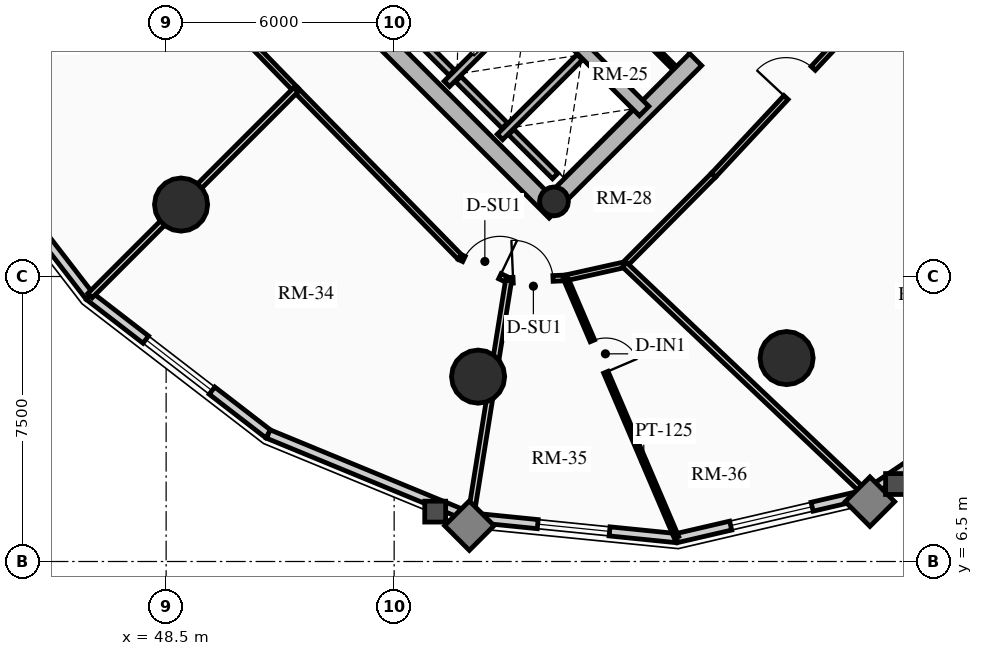
"""IFC4 building model, lengths in metres.
Left out: names, types, materials, properties, quantities, classifications, styles, units other than length and angle.
Written with IfcOpenShell. Run it as: python <this file> out.ifc"""

import sys

from ifc_helpers import new_model, si_unit, direction, frame, frame_2d, origin, origin_2d, place, context, subcontext, project, spatial, rectangle, circle, hollow_circle, extrude, source, transform, mapped, element, fill, save


model = new_model("IFC4")
c1 = context("Model", 3, precision=1e-05, world=origin(), true_north=direction((0.0, 1.0)))
c2 = subcontext(c1, "Body", "Model", "MODEL_VIEW")
j1 = project(units=[si_unit("LENGTHUNIT", "METRE"), si_unit("PLANEANGLEUNIT", "RADIAN")], contexts=[c1])
p1 = place(None, origin())
s1 = spatial("IfcSite", under=j1, at=p1, CompositionType="ELEMENT")
p2 = place(p1, origin())
s2 = spatial("IfcBuilding", under=s1, at=p2, CompositionType="ELEMENT")
p3 = place(p2, frame((0.0, 0.0, 84.7)))
s3 = spatial("IfcBuildingStorey", under=s2, at=p3, CompositionType="ELEMENT", Elevation=84.7)
p4 = place(p3, frame((58.737, 15.697, 0.0), z_axis=(0.0, 0.0, 1.0), x_axis=(-0.707106781187, 0.707106781187, 0.0)))
e1 = element("IfcWall", 1, at=p4, inside=s3, PredefinedType="SHEAR", context=c2, shape_type="SweptSolid", body=[
    extrude(rectangle(XDim=14.2, YDim=0.45, at=frame_2d((7.1, 0.0))), origin(), (0.0, 0.0, 1.0), 2.91),
])
p5 = place(p3, frame((58.578, 15.856, 0.0), z_axis=(0.0, 0.0, 1.0), x_axis=(0.707106781187, 0.707106781187, 0.0)))
e2 = element("IfcWall", 2, at=p5, inside=s3, PredefinedType="SHEAR", context=c2, shape_type="SweptSolid", body=[
    extrude(rectangle(XDim=10.7, YDim=0.45, at=frame_2d((5.35, 0.0))), origin(), (0.0, 0.0, 1.0), 2.91),
])
m1 = source(origin(), c2, "Body", "SweptSolid", [
    extrude(rectangle(XDim=1.5, YDim=2.02, at=frame_2d((0.75, 1.01))), frame((0.0, 0.235, 0.0), z_axis=(0.0, -1.0, 0.0), x_axis=(1.0, 0.0, 0.0)), (0.0, 0.0, 1.0), 0.47),
])
p6 = place(p5, frame((5.45, 0.0, 0.0)))
e3 = element("IfcOpeningElement", 3, at=p6, cuts=e2, PredefinedType="OPENING", context=c2, shape_type="MappedRepresentation", body=[
    mapped(m1, transform((0.0, 0.0, 0.0), x_axis=(1.0, 0.0, 0.0), y_axis=(0.0, 1.0, 0.0), z_axis=(0.0, 0.0, 1.0), scale=1.0)),
])
p7 = place(p3, frame((61.078, 18.355, 0.0), z_axis=(0.0, 0.0, 1.0), x_axis=(-0.707106781187, 0.707106781187, 0.0)))
e4 = element("IfcWall", 4, at=p7, inside=s3, PredefinedType="SHEAR", context=c2, shape_type="SweptSolid", body=[
    extrude(rectangle(XDim=13.75, YDim=0.35, at=frame_2d((6.875, 0.0))), origin(), (0.0, 0.0, 1.0), 2.91),
])
m2 = source(origin(), c2, "Body", "SweptSolid", [
    extrude(rectangle(XDim=1.1, YDim=2.015, at=frame_2d((0.55, 1.007))), frame((0.0, 0.185, 0.0), z_axis=(0.0, -1.0, 0.0), x_axis=(1.0, 0.0, 0.0)), (0.0, 0.0, 1.0), 0.37),
])
p8 = place(p7, frame((4.875, 0.0, 0.0)))
e5 = element("IfcOpeningElement", 5, at=p8, cuts=e4, PredefinedType="OPENING", context=c2, shape_type="MappedRepresentation", body=[
    mapped(m2, transform((0.0, 0.0, 0.0), x_axis=(1.0, 0.0, 0.0), y_axis=(0.0, 1.0, 0.0), z_axis=(0.0, 0.0, 1.0), scale=1.0)),
])
m3 = source(origin(), c2, "Body", "SweptSolid", [
    extrude(rectangle(XDim=1.15, YDim=2.02, at=frame_2d((0.575, 1.01))), frame((0.0, 0.185, 0.0), z_axis=(0.0, -1.0, 0.0), x_axis=(1.0, 0.0, 0.0)), (0.0, 0.0, 1.0), 0.37),
])
p9 = place(p7, frame((7.295, 0.0, 0.0)))
e6 = element("IfcOpeningElement", 6, at=p9, cuts=e4, PredefinedType="OPENING", context=c2, shape_type="MappedRepresentation", body=[
    mapped(m3, transform((0.0, 0.0, 0.0), x_axis=(1.0, 0.0, 0.0), y_axis=(0.0, 1.0, 0.0), z_axis=(0.0, 0.0, 1.0), scale=1.0)),
])
p10 = place(p3, frame((58.706, 15.976, 0.0), z_axis=(0.0, 0.0, 1.0), x_axis=(0.707106781187, 0.707106781187, 0.0)))
e7 = element("IfcColumn", 7, at=p10, inside=s3, PredefinedType="COLUMN", context=c2, shape_type="SweptSolid", body=[
    extrude(hollow_circle(Radius=0.38, WallThickness=0.032, at=origin_2d()), origin(), (0.0, 0.0, 1.0), 2.91),
])
for number, where, z_axis, x_axis in (
    (8, (48.893, 15.893, 0.0), (0.0, 0.0, 1.0), (1.0, 0.0, 0.0)),
    (9, (56.709, 11.365, 0.0), (0.0, 0.0, 1.0), (1.0, 0.0, 0.0)),
    (10, (64.827, 11.854, 0.0), (0.0, 0.0, 1.0), (1.0, 0.0, 0.0)),
):
    element("IfcColumn", number, at=place(p3, frame(where, z_axis=z_axis, x_axis=x_axis)), inside=s3, PredefinedType="USERDEFINED", context=c2, shape_type="SweptSolid", body=[
        extrude(circle(Radius=0.7, at=origin_2d()), origin(), (0.0, 0.0, 1.0), 2.91),
    ])
p11 = place(p3, frame((46.483, 13.483, 0.0), z_axis=(0.0, 0.0, 1.0), x_axis=(-0.61054437102, 0.791982052206, 0.0)))
e11 = element("IfcWall", 11, at=p11, inside=s3, PredefinedType="SOLIDWALL", context=c2, shape_type="SweptSolid", body=[
    extrude(rectangle(XDim=5.942, YDim=0.24, at=frame_2d((2.971, 0.0))), origin(), (0.0, 0.0, 1.0), 2.179),
])
p12 = place(p3, frame((51.189, 9.855, 0.0), z_axis=(0.0, 0.0, 1.0), x_axis=(-0.791982052206, 0.61054437102, 0.0)))
e12 = element("IfcWall", 12, at=p12, inside=s3, PredefinedType="SOLIDWALL", context=c2, shape_type="SweptSolid", body=[
    extrude(rectangle(XDim=5.942, YDim=0.24, at=frame_2d((2.971, 0.0))), origin(), (0.0, 0.0, 1.0), 2.179),
])
m4 = source(origin(), c2, "Body", "SweptSolid", [
    extrude(rectangle(XDim=2.2, YDim=1.35, at=frame_2d((1.1, 0.675))), frame((0.0, 0.13, 0.0), z_axis=(0.0, -1.0, 0.0), x_axis=(1.0, 0.0, 0.0)), (0.0, 0.0, 1.0), 0.26),
])
p13 = place(p12, frame((1.871, 0.0, 0.65)))
e13 = element("IfcOpeningElement", 13, at=p13, cuts=e12, PredefinedType="OPENING", context=c2, shape_type="MappedRepresentation", body=[
    mapped(m4, transform((0.0, 0.0, 0.0), x_axis=(1.0, 0.0, 0.0), y_axis=(0.0, 1.0, 0.0), z_axis=(0.0, 0.0, 1.0), scale=1.0)),
])
p14 = place(p3, frame((56.513, 7.661, 0.0), z_axis=(0.0, 0.0, 1.0), x_axis=(-0.924563909604, 0.381027003055, 0.0)))
e14 = element("IfcWall", 14, at=p14, inside=s3, PredefinedType="SOLIDWALL", context=c2, shape_type="SweptSolid", body=[
    extrude(rectangle(XDim=5.758, YDim=0.24, at=frame_2d((2.879, 0.0))), origin(), (0.0, 0.0, 1.0), 2.179),
])
p15 = place(p3, frame((61.933, 7.115, 0.0), z_axis=(0.0, 0.0, 1.0), x_axis=(-0.994971754311, 0.10015591906, 0.0)))
e15 = element("IfcWall", 15, at=p15, inside=s3, PredefinedType="SOLIDWALL", context=c2, shape_type="SweptSolid", body=[
    extrude(rectangle(XDim=5.448, YDim=0.24, at=frame_2d((2.724, 0.0))), origin(), (0.0, 0.0, 1.0), 2.179),
])
m5 = source(origin(), c2, "Body", "SweptSolid", [
    extrude(rectangle(XDim=1.9, YDim=1.35, at=frame_2d((0.95, 0.675))), frame((0.0, 0.13, 0.0), z_axis=(0.0, -1.0, 0.0), x_axis=(1.0, 0.0, 0.0)), (0.0, 0.0, 1.0), 0.26),
])
p16 = place(p15, frame((1.774, 0.0, 0.65)))
e16 = element("IfcOpeningElement", 16, at=p16, cuts=e15, PredefinedType="OPENING", context=c2, shape_type="MappedRepresentation", body=[
    mapped(m5, transform((0.0, 0.0, 0.0), x_axis=(1.0, 0.0, 0.0), y_axis=(0.0, 1.0, 0.0), z_axis=(0.0, 0.0, 1.0), scale=1.0)),
])
p17 = place(p3, frame((66.92, 8.271, 0.0), z_axis=(0.0, 0.0, 1.0), x_axis=(-0.974165631126, -0.225834725257, 0.0)))
e17 = element("IfcWall", 17, at=p17, inside=s3, PredefinedType="SOLIDWALL", context=c2, shape_type="SweptSolid", body=[
    extrude(rectangle(XDim=5.119, YDim=0.24, at=frame_2d((2.56, 0.0))), origin(), (0.0, 0.0, 1.0), 2.179),
])
p18 = place(p17, frame((1.459, 0.0, 0.65)))
e18 = element("IfcOpeningElement", 18, at=p18, cuts=e17, PredefinedType="OPENING", context=c2, shape_type="MappedRepresentation", body=[
    mapped(m4, transform((0.0, 0.0, 0.0), x_axis=(1.0, 0.0, 0.0), y_axis=(0.0, 1.0, 0.0), z_axis=(0.0, 0.0, 1.0), scale=1.0)),
])
p19 = place(p3, frame((70.985, 11.015, 0.0), z_axis=(0.0, 0.0, 1.0), x_axis=(-0.828781148131, -0.559572880421, 0.0)))
e19 = element("IfcWall", 19, at=p19, inside=s3, PredefinedType="SOLIDWALL", context=c2, shape_type="SweptSolid", body=[
    extrude(rectangle(XDim=4.905, YDim=0.24, at=frame_2d((2.452, 0.0))), origin(), (0.0, 0.0, 1.0), 2.179),
])
p20 = place(p3, frame((55.888, 19.069, 0.0), z_axis=(0.0, 0.0, 1.0), x_axis=(0.707106781187, 0.707106781187, 0.0)))
e20 = element("IfcWall", 20, at=p20, inside=s3, PredefinedType="SHEAR", context=c2, shape_type="SweptSolid", body=[
    extrude(rectangle(XDim=2.97, YDim=0.2, at=frame_2d((1.485, 0.0))), origin(), (0.0, 0.0, 1.0), 2.91),
])
p21 = place(p3, frame((56.015, 19.366, 0.0), z_axis=(0.0, 0.0, 1.0), x_axis=(-0.707106781187, 0.707106781187, 0.0)))
e21 = element("IfcWall", 21, at=p21, inside=s3, PredefinedType="SHEAR", context=c2, shape_type="SweptSolid", body=[
    extrude(rectangle(XDim=2.44, YDim=0.2, at=frame_2d((1.22, 0.0))), origin(), (0.0, 0.0, 1.0), 2.91),
])
p22 = place(p3, frame((57.284, 17.673, 0.0), z_axis=(0.0, 0.0, 1.0), x_axis=(0.707147878904, 0.70706568108, 0.0)))
e22 = element("IfcWall", 22, at=p22, inside=s3, PredefinedType="SHEAR", context=c2, shape_type="SweptSolid", body=[
    extrude(rectangle(XDim=2.97, YDim=0.2, at=frame_2d((1.485, 0.0))), origin(), (0.0, 0.0, 1.0), 2.91),
])
p23 = place(p3, frame((57.412, 17.97, 0.0), z_axis=(0.0, 0.0, 1.0), x_axis=(-0.707106781187, 0.707106781187, 0.0)))
e23 = element("IfcWall", 23, at=p23, inside=s3, PredefinedType="SHEAR", context=c2, shape_type="SweptSolid", body=[
    extrude(rectangle(XDim=1.735, YDim=0.2, at=frame_2d((0.867, 0.0))), origin(), (0.0, 0.0, 1.0), 2.91),
])
p24 = place(p3, frame((58.737, 16.644, 0.0), z_axis=(0.0, 0.0, 1.0), x_axis=(-0.707032117043, 0.707181437447, 0.0)))
e24 = element("IfcWall", 24, at=p24, inside=s3, PredefinedType="SHEAR", context=c2, shape_type="SweptSolid", body=[
    extrude(rectangle(XDim=1.635, YDim=0.2, at=frame_2d((0.817, 0.0))), origin(), (0.0, 0.0, 1.0), 2.91),
])
p25 = place(p3, frame((61.835, 19.529, 0.0), z_axis=(0.0, 0.0, 1.0), x_axis=(-0.707146413884, 0.707067146267, 0.0)))
e25 = element("IfcWall", 25, at=p25, inside=s3, PredefinedType="PARTITIONING", context=c2, shape_type="SweptSolid", body=[
    extrude(rectangle(XDim=3.08, YDim=0.125, at=frame_2d((1.54, 0.0))), origin(), (0.0, 0.0, 1.0), 2.655),
])
m6 = source(origin(), c2, "Body", "SweptSolid", [
    extrude(rectangle(XDim=0.9, YDim=2.005, at=frame_2d((0.45, 1.002))), frame((0.0, 0.073, 0.0), z_axis=(0.0, -1.0, 0.0), x_axis=(1.0, 0.0, 0.0)), (0.0, 0.0, 1.0), 0.145),
])
p26 = place(p25, frame((1.05, 0.0, 0.0)))
e26 = element("IfcOpeningElement", 26, at=p26, cuts=e25, PredefinedType="OPENING", context=c2, shape_type="MappedRepresentation", body=[
    mapped(m6, transform((0.0, 0.0, 0.0), x_axis=(1.0, 0.0, 0.0), y_axis=(0.0, 1.0, 0.0), z_axis=(0.0, 0.0, 1.0), scale=1.0)),
])
p27 = place(p3, frame((47.706, 23.253, 0.0), z_axis=(0.0, 0.0, 1.0), x_axis=(0.696179266346, -0.717867974707, 0.0)))
e27 = element("IfcWall", 27, at=p27, inside=s3, PredefinedType="PARTITIONING", context=c2, shape_type="SweptSolid", body=[
    extrude(rectangle(XDim=6.045, YDim=0.15, at=frame_2d((3.022, 0.0))), origin(), (0.0, 0.0, 1.0), 2.655),
])
m7 = source(origin(), c2, "Body", "SweptSolid", [
    extrude(rectangle(XDim=1.05, YDim=2.015, at=frame_2d((0.525, 1.007))), frame((0.0, 0.085, 0.0), z_axis=(0.0, -1.0, 0.0), x_axis=(1.0, 0.0, 0.0)), (0.0, 0.0, 1.0), 0.17),
])
p28 = place(p27, frame((2.497, 0.0, 0.0)))
e28 = element("IfcOpeningElement", 28, at=p28, cuts=e27, PredefinedType="OPENING", context=c2, shape_type="MappedRepresentation", body=[
    mapped(m7, transform((0.0, 0.0, 0.0), x_axis=(1.0, 0.0, 0.0), y_axis=(0.0, 1.0, 0.0), z_axis=(0.0, 0.0, 1.0), scale=1.0)),
])
p29 = place(p3, frame((51.914, 18.914, 0.0), z_axis=(0.0, 0.0, 1.0), x_axis=(0.699999313799, -0.714143515465, 0.0)))
e29 = element("IfcWall", 29, at=p29, inside=s3, PredefinedType="PARTITIONING", context=c2, shape_type="SweptSolid", body=[
    extrude(rectangle(XDim=6.162, YDim=0.15, at=frame_2d((3.081, 0.0))), origin(), (0.0, 0.0, 1.0), 2.225),
])
p30 = place(p3, frame((56.227, 14.513, 0.0), z_axis=(0.0, 0.0, 1.0), x_axis=(0.901477579283, -0.432825801044, 0.0)))
e30 = element("IfcWall", 30, at=p30, inside=s3, PredefinedType="PARTITIONING", context=c2, shape_type="SweptSolid", body=[
    extrude(rectangle(XDim=1.424, YDim=0.15, at=frame_2d((0.712, 0.0))), origin(), (0.0, 0.0, 1.0), 2.225),
])
p31 = place(p30, frame((0.12, 0.0, 0.0)))
e31 = element("IfcOpeningElement", 31, at=p31, cuts=e30, PredefinedType="OPENING", context=c2, shape_type="MappedRepresentation", body=[
    mapped(m7, transform((0.0, 0.0, 0.0), x_axis=(1.0, 0.0, 0.0), y_axis=(0.0, 1.0, 0.0), z_axis=(0.0, 0.0, 1.0), scale=1.0)),
])
p32 = place(p3, frame((57.511, 13.897, 0.0), z_axis=(0.0, 0.0, 1.0), x_axis=(0.999024538494, 0.044158481476, 0.0)))
e32 = element("IfcWall", 32, at=p32, inside=s3, PredefinedType="PARTITIONING", context=c2, shape_type="SweptSolid", body=[
    extrude(rectangle(XDim=1.498, YDim=0.15, at=frame_2d((0.749, 0.0))), origin(), (0.0, 0.0, 1.0), 2.225),
])
p33 = place(p32, frame((0.12, 0.0, 0.0)))
e33 = element("IfcOpeningElement", 33, at=p33, cuts=e32, PredefinedType="OPENING", context=c2, shape_type="MappedRepresentation", body=[
    mapped(m7, transform((0.0, 0.0, 0.0), x_axis=(1.0, 0.0, 0.0), y_axis=(0.0, 1.0, 0.0), z_axis=(0.0, 0.0, 1.0), scale=1.0)),
])
p34 = place(p3, frame((59.008, 13.963, 0.0), z_axis=(0.0, 0.0, 1.0), x_axis=(0.976020856791, 0.21767702476, 0.0)))
e34 = element("IfcWall", 34, at=p34, inside=s3, PredefinedType="PARTITIONING", context=c2, shape_type="SweptSolid", body=[
    extrude(rectangle(XDim=1.593, YDim=0.15, at=frame_2d((0.796, 0.0))), origin(), (0.0, 0.0, 1.0), 2.225),
])
p35 = place(p3, frame((60.562, 14.31, 0.0), z_axis=(0.0, 0.0, 1.0), x_axis=(0.704566236161, 0.709638230975, 0.0)))
e35 = element("IfcWall", 35, at=p35, inside=s3, PredefinedType="PARTITIONING", context=c2, shape_type="SweptSolid", body=[
    extrude(rectangle(XDim=3.321, YDim=0.15, at=frame_2d((1.661, 0.0))), origin(), (0.0, 0.0, 1.0), 2.225),
])
p36 = place(p3, frame((62.903, 16.667, 0.0), z_axis=(0.0, 0.0, 1.0), x_axis=(0.682371947497, 0.731005147225, 0.0)))
e36 = element("IfcWall", 36, at=p36, inside=s3, PredefinedType="PARTITIONING", context=c2, shape_type="SweptSolid", body=[
    extrude(rectangle(XDim=6.642, YDim=0.15, at=frame_2d((3.321, 0.0))), origin(), (0.0, 0.0, 1.0), 2.225),
])
p37 = place(p36, frame((2.796, 0.0, 0.0)))
e37 = element("IfcOpeningElement", 37, at=p37, cuts=e36, PredefinedType="OPENING", context=c2, shape_type="MappedRepresentation", body=[
    mapped(m7, transform((0.0, 0.0, 0.0), x_axis=(1.0, 0.0, 0.0), y_axis=(0.0, 1.0, 0.0), z_axis=(0.0, 0.0, 1.0), scale=1.0)),
])
p38 = place(p3, frame((51.914, 18.914, 0.0), z_axis=(0.0, 0.0, 1.0), x_axis=(-0.707106781187, -0.707106781187, 0.0)))
e38 = element("IfcWall", 38, at=p38, inside=s3, PredefinedType="PARTITIONING", context=c2, shape_type="SweptSolid", body=[
    extrude(rectangle(XDim=7.661, YDim=0.16, at=frame_2d((3.831, 0.0))), origin(), (0.0, 0.0, 1.0), 2.179),
])
p39 = place(p3, frame((57.511, 13.897, 0.0), z_axis=(0.0, 0.0, 1.0), x_axis=(-0.15810696167, -0.987421991183, 0.0)))
e39 = element("IfcWall", 39, at=p39, inside=s3, PredefinedType="PARTITIONING", context=c2, shape_type="SweptSolid", body=[
    extrude(rectangle(XDim=6.295, YDim=0.16, at=frame_2d((3.148, 0.0))), origin(), (0.0, 0.0, 1.0), 2.179),
])
p40 = place(p3, frame((60.562, 14.31, 0.0), z_axis=(0.0, 0.0, 1.0), x_axis=(0.725582293335, -0.688135404989, 0.0)))
e40 = element("IfcWall", 40, at=p40, inside=s3, PredefinedType="PARTITIONING", context=c2, shape_type="SweptSolid", body=[
    extrude(rectangle(XDim=8.749, YDim=0.16, at=frame_2d((4.375, 0.0))), origin(), (0.0, 0.0, 1.0), 2.179),
])
p41 = place(p3, frame((67.435, 21.521, 0.0), z_axis=(0.0, 0.0, 1.0), x_axis=(0.6983880073, -0.715719352302, 0.0)))
e41 = element("IfcWall", 41, at=p41, inside=s3, PredefinedType="PARTITIONING", context=c2, shape_type="SweptSolid", body=[
    extrude(rectangle(XDim=8.987, YDim=0.16, at=frame_2d((4.494, 0.0))), origin(), (0.0, 0.0, 1.0), 2.179),
])
p42 = place(p3, frame((59.008, 13.963, 0.0), z_axis=(0.0, 0.0, 1.0), x_axis=(0.393439207333, -0.919350635032, 0.0)))
e42 = element("IfcWall", 42, at=p42, inside=s3, PredefinedType="PARTITIONING", context=c2, shape_type="SweptSolid", body=[
    extrude(rectangle(XDim=7.427, YDim=0.125, at=frame_2d((3.713, 0.0))), origin(), (0.0, 0.0, 1.0), 2.179),
])
p43 = place(p42, frame((1.8, 0.0, 0.0)))
e43 = element("IfcOpeningElement", 43, at=p43, cuts=e42, PredefinedType="OPENING", context=c2, shape_type="MappedRepresentation", body=[
    mapped(m6, transform((0.0, 0.0, 0.0), x_axis=(1.0, 0.0, 0.0), y_axis=(0.0, 1.0, 0.0), z_axis=(0.0, 0.0, 1.0), scale=1.0)),
])
m8 = source(origin(), c2, "Body", "SweptSolid", [
    extrude(rectangle(XDim=2.2, YDim=1.35, at=frame_2d((1.1, 0.675))), frame((0.0, 0.03, 0.0), z_axis=(0.0, -1.0, 0.0), x_axis=(1.0, 0.0, 0.0)), (0.0, 0.0, 1.0), 0.06),
])
p44 = place(p13, origin())
e44 = element("IfcWindow", 44, at=p44, inside=s3, PartitioningType="DOUBLE_PANEL_VERTICAL", PredefinedType="WINDOW", context=c2, shape_type="MappedRepresentation", body=[
    mapped(m8, transform((0.0, 0.0, 0.0), x_axis=(1.0, 0.0, 0.0), y_axis=(0.0, 1.0, 0.0), z_axis=(0.0, 0.0, 1.0), scale=1.0)),
])
fill(e13, e44)
m9 = source(origin(), c2, "Body", "SweptSolid", [
    extrude(rectangle(XDim=1.9, YDim=1.35, at=frame_2d((0.95, 0.675))), frame((0.0, 0.03, 0.0), z_axis=(0.0, -1.0, 0.0), x_axis=(1.0, 0.0, 0.0)), (0.0, 0.0, 1.0), 0.06),
])
p45 = place(p16, origin())
e45 = element("IfcWindow", 45, at=p45, inside=s3, PartitioningType="DOUBLE_PANEL_VERTICAL", PredefinedType="WINDOW", context=c2, shape_type="MappedRepresentation", body=[
    mapped(m9, transform((0.0, 0.0, 0.0), x_axis=(1.0, 0.0, 0.0), y_axis=(0.0, 1.0, 0.0), z_axis=(0.0, 0.0, 1.0), scale=1.0)),
])
fill(e16, e45)
p46 = place(p18, origin())
e46 = element("IfcWindow", 46, at=p46, inside=s3, PartitioningType="DOUBLE_PANEL_VERTICAL", PredefinedType="WINDOW", context=c2, shape_type="MappedRepresentation", body=[
    mapped(m8, transform((0.0, 0.0, 0.0), x_axis=(1.0, 0.0, 0.0), y_axis=(0.0, 1.0, 0.0), z_axis=(0.0, 0.0, 1.0), scale=1.0)),
])
fill(e18, e46)
m10 = source(origin(), c2, "Body", "SweptSolid", [
    extrude(rectangle(XDim=1.5, YDim=2.02, at=frame_2d((0.75, 1.01))), frame((0.0, 0.025, 0.0), z_axis=(0.0, -1.0, 0.0), x_axis=(1.0, 0.0, 0.0)), (0.0, 0.0, 1.0), 0.05),
])
p47 = place(p6, origin())
e47 = element("IfcDoor", 47, at=p47, inside=s3, OperationType="DOUBLE_DOOR_SINGLE_SWING", PredefinedType="DOOR", context=c2, shape_type="MappedRepresentation", body=[
    mapped(m10, transform((0.0, 0.0, 0.0), x_axis=(1.0, 0.0, 0.0), y_axis=(0.0, 1.0, 0.0), z_axis=(0.0, 0.0, 1.0), scale=1.0)),
])
fill(e3, e47)
m11 = source(origin(), c2, "Body", "SweptSolid", [
    extrude(rectangle(XDim=1.05, YDim=2.015, at=frame_2d((0.525, 1.007))), frame((0.0, 0.025, 0.0), z_axis=(0.0, -1.0, 0.0), x_axis=(1.0, 0.0, 0.0)), (0.0, 0.0, 1.0), 0.05),
])
p48 = place(p31, origin())
e48 = element("IfcDoor", 48, at=p48, inside=s3, OperationType="SINGLE_SWING_RIGHT", PredefinedType="DOOR", context=c2, shape_type="MappedRepresentation", body=[
    mapped(m11, transform((0.0, 0.0, 0.0), x_axis=(1.0, 0.0, 0.0), y_axis=(0.0, 1.0, 0.0), z_axis=(0.0, 0.0, 1.0), scale=1.0)),
])
fill(e31, e48)
p49 = place(p33, origin())
e49 = element("IfcDoor", 49, at=p49, inside=s3, OperationType="SINGLE_SWING_LEFT", PredefinedType="DOOR", context=c2, shape_type="MappedRepresentation", body=[
    mapped(m11, transform((0.0, 0.0, 0.0), x_axis=(1.0, 0.0, 0.0), y_axis=(0.0, 1.0, 0.0), z_axis=(0.0, 0.0, 1.0), scale=1.0)),
])
fill(e33, e49)
m12 = source(origin(), c2, "Body", "SweptSolid", [
    extrude(rectangle(XDim=0.9, YDim=2.005, at=frame_2d((0.45, 1.002))), frame((0.0, 0.025, 0.0), z_axis=(0.0, -1.0, 0.0), x_axis=(1.0, 0.0, 0.0)), (0.0, 0.0, 1.0), 0.05),
])
p50 = place(p43, origin())
e50 = element("IfcDoor", 50, at=p50, inside=s3, OperationType="SINGLE_SWING_RIGHT", PredefinedType="DOOR", context=c2, shape_type="MappedRepresentation", body=[
    mapped(m12, transform((0.0, 0.0, 0.0), x_axis=(1.0, 0.0, 0.0), y_axis=(0.0, 1.0, 0.0), z_axis=(0.0, 0.0, 1.0), scale=1.0)),
])
fill(e43, e50)
p51 = place(p37, origin())
e51 = element("IfcDoor", 51, at=p51, inside=s3, OperationType="SINGLE_SWING_LEFT", PredefinedType="DOOR", context=c2, shape_type="MappedRepresentation", body=[
    mapped(m11, transform((0.0, 0.0, 0.0), x_axis=(1.0, 0.0, 0.0), y_axis=(0.0, 1.0, 0.0), z_axis=(0.0, 0.0, 1.0), scale=1.0)),
])
fill(e37, e51)
save(model, sys.argv[1])
